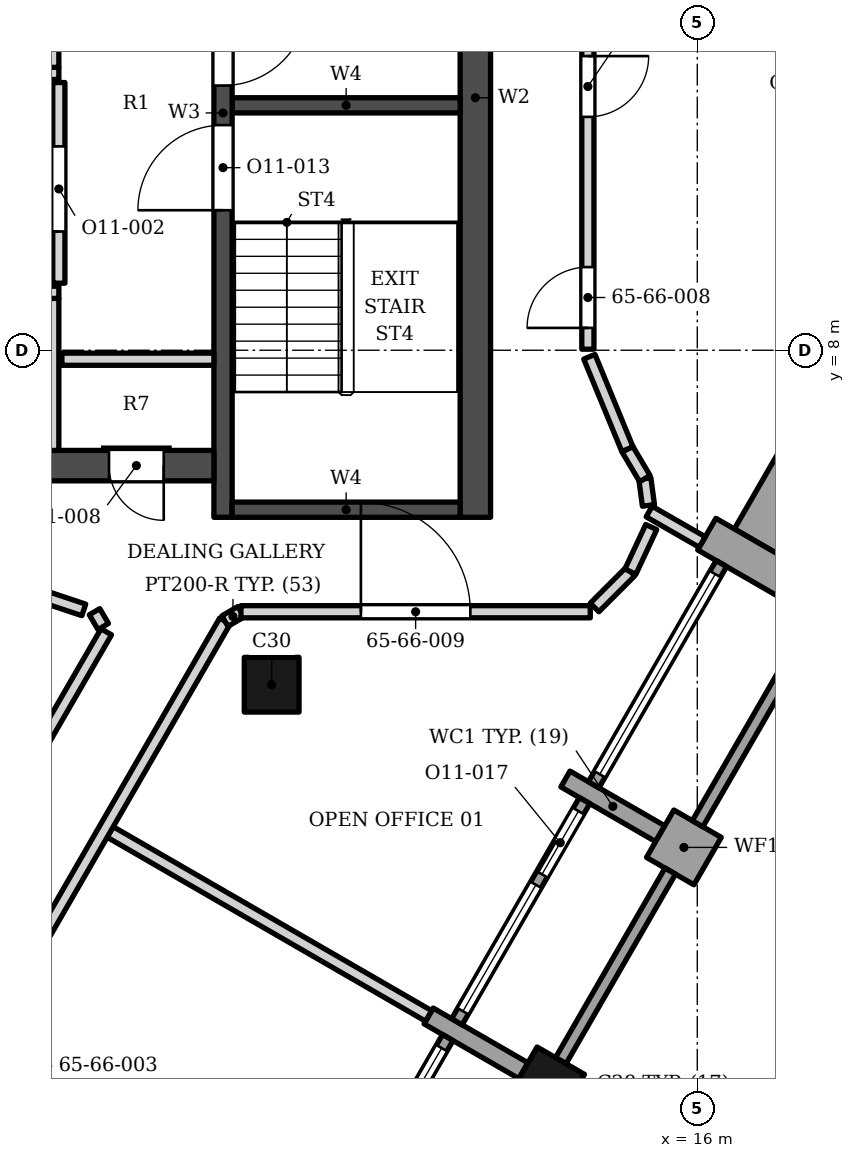
"""IFC4 building model, lengths in metres.
Left out: names, types, materials, properties, quantities, classifications, styles, units other than length and angle.
Written with IfcOpenShell. Run it as: python <this file> out.ifc"""

import sys

from ifc_helpers import new_model, si_unit, direction, frame, frame_2d, origin, origin_2d, place, context, subcontext, project, spatial, polyline, rectangle, outline, extrude, element, fill, save


model = new_model("IFC4")
c1 = context("Model", 3, precision=1e-05, world=origin(), true_north=direction((0.0, 1.0)))
c2 = subcontext(c1, "Body", "Model", "MODEL_VIEW")
j1 = project(units=[si_unit("LENGTHUNIT", "METRE"), si_unit("PLANEANGLEUNIT", "RADIAN")], contexts=[c1])
p1 = place(None, origin())
s1 = spatial("IfcSite", under=j1, at=p1, CompositionType="ELEMENT")
p2 = place(p1, origin())
s2 = spatial("IfcBuilding", under=s1, at=p2, CompositionType="ELEMENT")
p3 = place(p2, frame((0.0, 0.0, 271.6)))
s3 = spatial("IfcBuildingStorey", under=s2, at=p3, CompositionType="ELEMENT", Elevation=271.6)
p4 = place(p3, frame((12.35, 5.253, 0.0), z_axis=(0.0, 0.0, 1.0), x_axis=(0.0, 1.0, 0.0)))
e1 = element("IfcWall", 1, at=p4, inside=s3, PredefinedType="SHEAR", context=c2, shape_type="SweptSolid", body=[
    extrude(rectangle(XDim=13.8, YDim=0.5, at=frame_2d((6.9, 0.0))), origin(), (0.0, 0.0, 1.0), 3.9),
])
p5 = place(p3, frame((8.2, 5.253, 0.0), z_axis=(0.0, 0.0, 1.0), x_axis=(0.0, 1.0, 0.0)))
e2 = element("IfcWall", 2, at=p5, inside=s3, PredefinedType="SHEAR", context=c2, shape_type="SweptSolid", body=[
    extrude(rectangle(XDim=13.3, YDim=0.3, at=frame_2d((6.65, 0.0))), origin(), (0.0, 0.0, 1.0), 3.9),
])
p6 = place(p5, frame((7.1, 0.0, 0.0)))
e3 = element("IfcOpeningElement", 3, at=p6, cuts=e2, PredefinedType="OPENING", context=c2, shape_type="SweptSolid", body=[
    extrude(rectangle(XDim=1.4, YDim=2.1, at=frame_2d((0.7, 1.05))), frame((0.0, 0.16, 0.0), z_axis=(0.0, -1.0, 0.0), x_axis=(1.0, 0.0, 0.0)), (0.0, 0.0, 1.0), 0.32),
])
p7 = place(p5, frame((5.05, 0.0, 0.0)))
e4 = element("IfcOpeningElement", 4, at=p7, cuts=e2, PredefinedType="OPENING", context=c2, shape_type="SweptSolid", body=[
    extrude(rectangle(XDim=1.4, YDim=2.1, at=frame_2d((0.7, 1.05))), frame((0.0, 0.16, 0.0), z_axis=(0.0, -1.0, 0.0), x_axis=(1.0, 0.0, 0.0)), (0.0, 0.0, 1.0), 0.32),
])
for number, where, z_axis, x_axis in (
    (5, (8.35, 12.028, 0.0), (0.0, 0.0, 1.0), (1.0, 0.0, 0.0)),
    (6, (8.35, 5.378, 0.0), (0.0, 0.0, 1.0), (1.0, 0.0, 0.0)),
):
    element("IfcWall", number, at=place(p3, frame(where, z_axis=z_axis, x_axis=x_axis)), inside=s3, PredefinedType="SHEAR", context=c2, shape_type="SweptSolid", body=[
        extrude(rectangle(XDim=3.75, YDim=0.25, at=frame_2d((1.875, 0.0))), origin(), (0.0, 0.0, 1.0), 3.9),
    ])
p8 = place(p3, frame((1.0, 6.103, 0.0), z_axis=(0.0, 0.0, 1.0), x_axis=(1.0, 0.0, 0.0)))
e7 = element("IfcWall", 7, at=p8, inside=s3, PredefinedType="SHEAR", context=c2, shape_type="SweptSolid", body=[
    extrude(rectangle(XDim=7.05, YDim=0.5, at=frame_2d((3.525, 0.0))), origin(), (0.0, 0.0, 1.0), 3.9),
])
p9 = place(p8, frame((5.325, 0.0, 0.0)))
e8 = element("IfcOpeningElement", 8, at=p9, cuts=e7, PredefinedType="OPENING", context=c2, shape_type="SweptSolid", body=[
    extrude(rectangle(XDim=0.9, YDim=2.1, at=frame_2d((0.45, 1.05))), frame((0.0, 0.26, 0.0), z_axis=(0.0, -1.0, 0.0), x_axis=(1.0, 0.0, 0.0)), (0.0, 0.0, 1.0), 0.52),
])
for number, where, z_axis, x_axis in (
    (9, (9.0, 2.5, 0.0), (0.0, 0.0, 1.0), (1.0, 0.0, 0.0)),
    (10, (13.53, -4.073, 0.0), (0.0, 0.0, 1.0), (0.5, 0.866, 0.0)),
):
    element("IfcColumn", number, at=place(p3, frame(where, z_axis=z_axis, x_axis=x_axis)), inside=s3, PredefinedType="COLUMN", context=c2, shape_type="SweptSolid", body=[
        extrude(rectangle(XDim=0.9, YDim=0.9, at=origin_2d()), origin(), (0.0, 0.0, 1.0), 3.9),
    ])
p10 = place(p3, frame((13.14, -3.848, 0.0), z_axis=(0.0, 0.0, 1.0), x_axis=(-0.866047807691, 0.499961193289, 0.0)))
e11 = element("IfcWall", 11, at=p10, inside=s3, PredefinedType="SOLIDWALL", context=c2, shape_type="SweptSolid", body=[
    extrude(rectangle(XDim=1.8, YDim=0.3, at=frame_2d((0.9, 0.0))), origin(), (0.0, 0.0, 1.0), 3.0),
])
p11 = place(p3, frame((16.17, -0.401, 0.0), z_axis=(0.0, 0.0, 1.0), x_axis=(-0.866081705922, 0.499902469156, 0.0)))
e12 = element("IfcWall", 12, at=p11, inside=s3, PredefinedType="SOLIDWALL", context=c2, shape_type="SweptSolid", body=[
    extrude(rectangle(XDim=0.9, YDim=0.9, at=frame_2d((0.45, 0.0))), origin(), (0.0, 0.0, 1.0), 3.0),
])
p12 = place(p3, frame((13.831, 0.949, 0.0), z_axis=(0.0, 0.0, 1.0), x_axis=(0.865989075817, -0.500062916607, 0.0)))
e13 = element("IfcWall", 13, at=p12, inside=s3, PredefinedType="SOLIDWALL", context=c2, shape_type="SweptSolid", body=[
    extrude(rectangle(XDim=1.8, YDim=0.3, at=frame_2d((0.9, 0.0))), origin(), (0.0, 0.0, 1.0), 3.0),
])
p13 = place(p3, frame((17.715, 4.076, 0.0), z_axis=(0.0, 0.0, 1.0), x_axis=(-0.866047807691, 0.499961193289, 0.0)))
e14 = element("IfcWall", 14, at=p13, inside=s3, PredefinedType="SOLIDWALL", context=c2, shape_type="SweptSolid", body=[
    extrude(rectangle(XDim=1.8, YDim=0.6, at=frame_2d((0.9, 0.0))), origin(), (0.0, 0.0, 1.0), 2.95),
])
p14 = place(p3, frame((9.796, -6.94, 0.0), z_axis=(0.0, 0.0, 1.0), x_axis=(0.499958946799, 0.866049104564, 0.0)))
e15 = element("IfcWall", 15, at=p14, inside=s3, PredefinedType="ELEMENTEDWALL", context=c2, shape_type="SweptSolid", body=[
    extrude(rectangle(XDim=4.2, YDim=0.2, at=frame_2d((2.1, 0.0))), origin(), (0.0, 0.0, 1.0), 3.0),
])
p15 = place(p14, frame((0.2, 0.0, 0.45)))
e16 = element("IfcOpeningElement", 16, at=p15, cuts=e15, PredefinedType="OPENING", context=c2, shape_type="SweptSolid", body=[
    extrude(rectangle(XDim=3.8, YDim=2.25, at=frame_2d((1.9, 1.125))), frame((0.0, 0.11, 0.0), z_axis=(0.0, -1.0, 0.0), x_axis=(1.0, 0.0, 0.0)), (0.0, 0.0, 1.0), 0.22),
])
p16 = place(p3, frame((13.755, -3.683, 0.0), z_axis=(0.0, 0.0, 1.0), x_axis=(0.499982693035, 0.866035395735, 0.0)))
e17 = element("IfcWall", 17, at=p16, inside=s3, PredefinedType="SOLIDWALL", context=c2, shape_type="SweptSolid", body=[
    extrude(rectangle(XDim=3.6, YDim=0.2, at=frame_2d((1.8, 0.0))), origin(), (0.0, 0.0, 1.0), 3.0),
])
p17 = place(p3, frame((12.046, -3.043, 0.0), z_axis=(0.0, 0.0, 1.0), x_axis=(0.49998411664, 0.866034573852, 0.0)))
e18 = element("IfcWall", 18, at=p17, inside=s3, PredefinedType="ELEMENTEDWALL", context=c2, shape_type="SweptSolid", body=[
    extrude(rectangle(XDim=4.2, YDim=0.2, at=frame_2d((2.1, 0.0))), origin(), (0.0, 0.0, 1.0), 3.0),
])
p18 = place(p17, frame((0.2, 0.0, 0.45)))
e19 = element("IfcOpeningElement", 19, at=p18, cuts=e18, PredefinedType="OPENING", context=c2, shape_type="SweptSolid", body=[
    extrude(rectangle(XDim=2.4, YDim=2.25, at=frame_2d((1.2, 1.125))), frame((0.0, 0.11, 0.0), z_axis=(0.0, -1.0, 0.0), x_axis=(1.0, 0.0, 0.0)), (0.0, 0.0, 1.0), 0.22),
])
p19 = place(p17, frame((2.8, 0.0, 0.0)))
e20 = element("IfcOpeningElement", 20, at=p19, cuts=e18, PredefinedType="OPENING", context=c2, shape_type="SweptSolid", body=[
    extrude(rectangle(XDim=1.2, YDim=2.7, at=frame_2d((0.6, 1.35))), frame((0.0, 0.11, 0.0), z_axis=(0.0, -1.0, 0.0), x_axis=(1.0, 0.0, 0.0)), (0.0, 0.0, 1.0), 0.22),
])
p20 = place(p3, frame((16.005, 0.214, 0.0), z_axis=(0.0, 0.0, 1.0), x_axis=(0.500012057535, 0.866018442252, 0.0)))
e21 = element("IfcWall", 21, at=p20, inside=s3, PredefinedType="SOLIDWALL", context=c2, shape_type="SweptSolid", body=[
    extrude(rectangle(XDim=3.6, YDim=0.2, at=frame_2d((1.8, 0.0))), origin(), (0.0, 0.0, 1.0), 3.0),
])
p21 = place(p3, frame((14.296, 0.854, 0.0), z_axis=(0.0, 0.0, 1.0), x_axis=(0.499958946799, 0.866049104564, 0.0)))
e22 = element("IfcWall", 22, at=p21, inside=s3, PredefinedType="ELEMENTEDWALL", context=c2, shape_type="SweptSolid", body=[
    extrude(rectangle(XDim=4.2, YDim=0.2, at=frame_2d((2.1, 0.0))), origin(), (0.0, 0.0, 1.0), 2.95),
])
p22 = place(p21, frame((0.2, 0.0, 0.45)))
e23 = element("IfcOpeningElement", 23, at=p22, cuts=e22, PredefinedType="OPENING", context=c2, shape_type="SweptSolid", body=[
    extrude(rectangle(XDim=3.8, YDim=2.25, at=frame_2d((1.9, 1.125))), frame((0.0, 0.11, 0.0), z_axis=(0.0, -1.0, 0.0), x_axis=(1.0, 0.0, 0.0)), (0.0, 0.0, 1.0), 0.22),
])
p23 = place(p3, origin())
e24 = element("IfcWall", 24, at=p23, inside=s3, PredefinedType="SOLIDWALL", context=c2, shape_type="SweptSolid", body=[
    extrude(outline(polyline([(18.236, 7.878), (16.609, 5.061), (18.645, 3.886), (20.271, 6.703), (18.236, 7.878)])), origin(), (0.0, 0.0, 1.0), 2.973),
])
for number, where, z_axis, x_axis in (
    (25, (5.4, 6.353, 0.0), (0.0, 0.0, 1.0), (0.0, 1.0, 0.0)),
    (26, (5.55, 7.853, 0.0), (0.0, 0.0, 1.0), (1.0, 0.0, 0.0)),
):
    element("IfcWall", number, at=place(p3, frame(where, z_axis=z_axis, x_axis=x_axis)), inside=s3, PredefinedType="SOLIDWALL", context=c2, shape_type="SweptSolid", body=[
        extrude(rectangle(XDim=2.5, YDim=0.2, at=frame_2d((1.25, 0.0))), origin(), (0.0, 0.0, 1.0), 3.73),
    ])
p24 = place(p3, frame((1.0, 8.953, 0.0), z_axis=(0.0, 0.0, 1.0), x_axis=(1.0, 0.0, 0.0)))
e27 = element("IfcWall", 27, at=p24, inside=s3, PredefinedType="SOLIDWALL", context=c2, shape_type="SweptSolid", body=[
    extrude(rectangle(XDim=4.5, YDim=0.2, at=frame_2d((2.25, 0.0))), origin(), (0.0, 0.0, 1.0), 3.73),
])
p25 = place(p24, frame((0.625, 0.0, 0.0)))
e28 = element("IfcOpeningElement", 28, at=p25, cuts=e27, PredefinedType="OPENING", context=c2, shape_type="SweptSolid", body=[
    extrude(rectangle(XDim=1.1, YDim=2.1, at=frame_2d((0.55, 1.05))), frame((0.0, 0.11, 0.0), z_axis=(0.0, -1.0, 0.0), x_axis=(1.0, 0.0, 0.0)), (0.0, 0.0, 1.0), 0.22),
])
p26 = place(p24, frame((2.775, 0.0, 0.0)))
e29 = element("IfcOpeningElement", 29, at=p26, cuts=e27, PredefinedType="OPENING", context=c2, shape_type="SweptSolid", body=[
    extrude(rectangle(XDim=1.1, YDim=2.1, at=frame_2d((0.55, 1.05))), frame((0.0, 0.11, 0.0), z_axis=(0.0, -1.0, 0.0), x_axis=(1.0, 0.0, 0.0)), (0.0, 0.0, 1.0), 0.22),
])
p27 = place(p3, frame((5.5, 9.103, 0.0), z_axis=(0.0, 0.0, 1.0), x_axis=(0.0, 1.0, 0.0)))
e30 = element("IfcWall", 30, at=p27, inside=s3, PredefinedType="SOLIDWALL", context=c2, shape_type="SweptSolid", body=[
    extrude(rectangle(XDim=3.3, YDim=0.2, at=frame_2d((1.65, 0.0))), origin(), (0.0, 0.0, 1.0), 3.73),
])
p28 = place(p27, frame((0.85, 0.0, 0.0)))
e31 = element("IfcOpeningElement", 31, at=p28, cuts=e30, PredefinedType="OPENING", context=c2, shape_type="SweptSolid", body=[
    extrude(rectangle(XDim=1.4, YDim=2.1, at=frame_2d((0.7, 1.05))), frame((0.0, 0.11, 0.0), z_axis=(0.0, -1.0, 0.0), x_axis=(1.0, 0.0, 0.0)), (0.0, 0.0, 1.0), 0.22),
])
p29 = place(p3, frame((-1.5, 12.552, 0.0), z_axis=(0.0, 0.0, 1.0), x_axis=(1.0, 0.0, 0.0)))
e32 = element("IfcWall", 32, at=p29, inside=s3, PredefinedType="SOLIDWALL", context=c2, shape_type="SweptSolid", body=[
    extrude(rectangle(XDim=7.0, YDim=0.2, at=frame_2d((3.5, 0.0))), origin(), (0.0, 0.0, 1.0), 3.73),
])
p30 = place(p29, frame((3.075, 0.0, 0.0)))
e33 = element("IfcOpeningElement", 33, at=p30, cuts=e32, PredefinedType="OPENING", context=c2, shape_type="SweptSolid", body=[
    extrude(rectangle(XDim=1.1, YDim=2.1, at=frame_2d((0.55, 1.05))), frame((0.0, 0.11, 0.0), z_axis=(0.0, -1.0, 0.0), x_axis=(1.0, 0.0, 0.0)), (0.0, 0.0, 1.0), 0.22),
])
p31 = place(p29, frame((5.275, 0.0, 0.0)))
e34 = element("IfcOpeningElement", 34, at=p31, cuts=e32, PredefinedType="OPENING", context=c2, shape_type="SweptSolid", body=[
    extrude(rectangle(XDim=1.1, YDim=2.1, at=frame_2d((0.55, 1.05))), frame((0.0, 0.11, 0.0), z_axis=(0.0, -1.0, 0.0), x_axis=(1.0, 0.0, 0.0)), (0.0, 0.0, 1.0), 0.22),
])
p32 = place(p3, frame((5.4, 12.653, 0.0), z_axis=(0.0, 0.0, 1.0), x_axis=(0.0, 1.0, 0.0)))
e35 = element("IfcWall", 35, at=p32, inside=s3, PredefinedType="SOLIDWALL", context=c2, shape_type="SweptSolid", body=[
    extrude(rectangle(XDim=1.6, YDim=0.2, at=frame_2d((0.8, 0.0))), origin(), (0.0, 0.0, 1.0), 3.73),
])
p33 = place(p3, frame((6.344, 0.079, 0.0), z_axis=(0.0, 0.0, 1.0), x_axis=(0.865886439471, -0.500240616045, 0.0)))
e36 = element("IfcWall", 36, at=p33, inside=s3, PredefinedType="PARTITIONING", context=c2, shape_type="SweptSolid", body=[
    extrude(rectangle(XDim=6.049, YDim=0.2, at=frame_2d((3.025, 0.0))), origin(), (0.0, 0.0, 1.0), 3.052),
])
p34 = place(p3, frame((4.894, 0.974, 0.0), z_axis=(0.0, 0.0, 1.0), x_axis=(0.500549430369, 0.865707957545, 0.0)))
e37 = element("IfcWall", 37, at=p34, inside=s3, PredefinedType="PARTITIONING", context=c2, shape_type="SweptSolid", body=[
    extrude(rectangle(XDim=2.768, YDim=0.2, at=frame_2d((1.384, 0.0))), origin(), (0.0, 0.0, 1.0), 3.73),
])
p35 = place(p3, frame((6.087, 3.7, 0.0), z_axis=(0.0, 0.0, 1.0), x_axis=(0.503763385613, -0.863841681858, 0.0)))
e38 = element("IfcWall", 38, at=p35, inside=s3, PredefinedType="PARTITIONING", context=c2, shape_type="SweptSolid", body=[
    extrude(rectangle(XDim=0.282, YDim=0.2, at=frame_2d((0.141, 0.0))), origin(), (0.0, 0.0, 1.0), 3.73),
])
p36 = place(p3, frame((1.757, -7.668, 0.0), z_axis=(0.0, 0.0, 1.0), x_axis=(0.500002084865, 0.866024200084, 0.0)))
e39 = element("IfcWall", 39, at=p36, inside=s3, PredefinedType="PARTITIONING", context=c2, shape_type="SweptSolid", body=[
    extrude(rectangle(XDim=12.949, YDim=0.2, at=frame_2d((6.474, 0.0))), origin(), (0.0, 0.0, 1.0), 2.884),
])
p37 = place(p36, frame((4.0, 0.0, 0.0)))
e40 = element("IfcOpeningElement", 40, at=p37, cuts=e39, PredefinedType="OPENING", context=c2, shape_type="SweptSolid", body=[
    extrude(rectangle(XDim=1.0, YDim=2.4, at=frame_2d((0.5, 1.2))), frame((0.0, 0.11, 0.0), z_axis=(0.0, -1.0, 0.0), x_axis=(1.0, 0.0, 0.0)), (0.0, 0.0, 1.0), 0.22),
])
p38 = place(p3, frame((8.231, 3.546, 0.0), z_axis=(0.0, 0.0, 1.0), x_axis=(0.863778900898, 0.503871025524, 0.0)))
e41 = element("IfcWall", 41, at=p38, inside=s3, PredefinedType="PARTITIONING", context=c2, shape_type="SweptSolid", body=[
    extrude(rectangle(XDim=0.305, YDim=0.2, at=frame_2d((0.153, 0.0))), origin(), (0.0, 0.0, 1.0), 3.73),
])
p39 = place(p3, frame((8.495, 3.699, 0.0), z_axis=(0.0, 0.0, 1.0), x_axis=(1.0, 0.0, 0.0)))
e42 = element("IfcWall", 42, at=p39, inside=s3, PredefinedType="PARTITIONING", context=c2, shape_type="SweptSolid", body=[
    extrude(rectangle(XDim=5.745, YDim=0.2, at=frame_2d((2.873, 0.0))), origin(), (0.0, 0.0, 1.0), 3.282),
])
p40 = place(p39, frame((1.972, 0.0, 0.0)))
e43 = element("IfcOpeningElement", 43, at=p40, cuts=e42, PredefinedType="OPENING", context=c2, shape_type="SweptSolid", body=[
    extrude(rectangle(XDim=1.8, YDim=2.4, at=frame_2d((0.9, 1.2))), frame((0.0, 0.11, 0.0), z_axis=(0.0, -1.0, 0.0), x_axis=(1.0, 0.0, 0.0)), (0.0, 0.0, 1.0), 0.22),
])
p41 = place(p3, frame((4.393, 4.236, 0.0), z_axis=(0.0, 0.0, 1.0), x_axis=(0.948729076189, -0.316090398453, 0.0)))
e44 = element("IfcWall", 44, at=p41, inside=s3, PredefinedType="PARTITIONING", context=c2, shape_type="SweptSolid", body=[
    extrude(rectangle(XDim=1.6, YDim=0.2, at=frame_2d((0.8, 0.0))), origin(), (0.0, 0.0, 1.0), 2.884),
])
p42 = place(p3, frame((14.311, 3.77, 0.0), z_axis=(0.0, 0.0, 1.0), x_axis=(0.707106781187, 0.707106781187, 0.0)))
e45 = element("IfcWall", 45, at=p42, inside=s3, PredefinedType="PARTITIONING", context=c2, shape_type="SweptSolid", body=[
    extrude(rectangle(XDim=0.834, YDim=0.2, at=frame_2d((0.417, 0.0))), origin(), (0.0, 0.0, 1.0), 3.73),
])
p43 = place(p3, frame((15.209, 5.348, 0.0), z_axis=(0.0, 0.0, 1.0), x_axis=(0.866911543868, -0.498462009695, 0.0)))
e46 = element("IfcWall", 46, at=p43, inside=s3, PredefinedType="PARTITIONING", context=c2, shape_type="SweptSolid", body=[
    extrude(rectangle(XDim=1.007, YDim=0.2, at=frame_2d((0.503, 0.0))), origin(), (0.0, 0.0, 1.0), 2.95),
])
p44 = place(p3, frame((14.9, 4.36, 0.0), z_axis=(0.0, 0.0, 1.0), x_axis=(0.423249280481, 0.906013270638, 0.0)))
e47 = element("IfcWall", 47, at=p44, inside=s3, PredefinedType="PARTITIONING", context=c2, shape_type="SweptSolid", body=[
    extrude(rectangle(XDim=0.808, YDim=0.2, at=frame_2d((0.404, 0.0))), origin(), (0.0, 0.0, 1.0), 2.95),
])
p45 = place(p3, frame((15.137, 5.889, 0.0), z_axis=(0.0, 0.0, 1.0), x_axis=(0.133422383108, -0.991059265476, 0.0)))
e48 = element("IfcWall", 48, at=p45, inside=s3, PredefinedType="PARTITIONING", context=c2, shape_type="SweptSolid", body=[
    extrude(rectangle(XDim=0.445, YDim=0.2, at=frame_2d((0.222, 0.0))), origin(), (0.0, 0.0, 1.0), 3.73),
])
p46 = place(p3, frame((14.851, 6.374, 0.0), z_axis=(0.0, 0.0, 1.0), x_axis=(0.509576505793, -0.860425351058, 0.0)))
e49 = element("IfcWall", 49, at=p46, inside=s3, PredefinedType="PARTITIONING", context=c2, shape_type="SweptSolid", body=[
    extrude(rectangle(XDim=0.563, YDim=0.2, at=frame_2d((0.281, 0.0))), origin(), (0.0, 0.0, 1.0), 3.73),
])
p47 = place(p3, frame((14.225, 7.893, 0.0), z_axis=(0.0, 0.0, 1.0), x_axis=(0.380697489052, -0.924699638709, 0.0)))
e50 = element("IfcWall", 50, at=p47, inside=s3, PredefinedType="PARTITIONING", context=c2, shape_type="SweptSolid", body=[
    extrude(rectangle(XDim=1.643, YDim=0.2, at=frame_2d((0.822, 0.0))), origin(), (0.0, 0.0, 1.0), 3.73),
])
p48 = place(p3, frame((14.2, 8.017, 0.0), z_axis=(0.0, 0.0, 1.0), x_axis=(0.0, 1.0, 0.0)))
e51 = element("IfcWall", 51, at=p48, inside=s3, PredefinedType="PARTITIONING", context=c2, shape_type="SweptSolid", body=[
    extrude(rectangle(XDim=5.4, YDim=0.2, at=frame_2d((2.7, 0.0))), origin(), (0.0, 0.0, 1.0), 3.73),
])
p49 = place(p48, frame((3.82, 0.0, 0.0)))
e52 = element("IfcOpeningElement", 52, at=p49, cuts=e51, PredefinedType="OPENING", context=c2, shape_type="SweptSolid", body=[
    extrude(rectangle(XDim=1.0, YDim=2.1, at=frame_2d((0.5, 1.05))), frame((0.0, 0.11, 0.0), z_axis=(0.0, -1.0, 0.0), x_axis=(1.0, 0.0, 0.0)), (0.0, 0.0, 1.0), 0.22),
])
p50 = place(p48, frame((0.35, 0.0, 0.0)))
e53 = element("IfcOpeningElement", 53, at=p50, cuts=e51, PredefinedType="OPENING", context=c2, shape_type="SweptSolid", body=[
    extrude(rectangle(XDim=1.0, YDim=2.1, at=frame_2d((0.5, 1.05))), frame((0.0, 0.11, 0.0), z_axis=(0.0, -1.0, 0.0), x_axis=(1.0, 0.0, 0.0)), (0.0, 0.0, 1.0), 0.22),
])
p51 = place(p15, origin())
e54 = element("IfcWindow", 54, at=p51, inside=s3, PartitioningType="SINGLE_PANEL", PredefinedType="WINDOW", context=c2, shape_type="SweptSolid", body=[
    extrude(rectangle(XDim=3.8, YDim=2.25, at=frame_2d((1.9, 1.125))), frame((0.0, 0.03, 0.0), z_axis=(0.0, -1.0, 0.0), x_axis=(1.0, 0.0, 0.0)), (0.0, 0.0, 1.0), 0.06),
])
fill(e16, e54)
p52 = place(p18, origin())
e55 = element("IfcWindow", 55, at=p52, inside=s3, PartitioningType="SINGLE_PANEL", PredefinedType="WINDOW", context=c2, shape_type="SweptSolid", body=[
    extrude(rectangle(XDim=2.4, YDim=2.25, at=frame_2d((1.2, 1.125))), frame((0.0, 0.03, 0.0), z_axis=(0.0, -1.0, 0.0), x_axis=(1.0, 0.0, 0.0)), (0.0, 0.0, 1.0), 0.06),
])
fill(e19, e55)
p53 = place(p19, origin())
e56 = element("IfcDoor", 56, at=p53, inside=s3, OperationType="SINGLE_SWING_LEFT", PredefinedType="DOOR", context=c2, shape_type="SweptSolid", body=[
    extrude(rectangle(XDim=1.2, YDim=2.7, at=frame_2d((0.6, 1.35))), frame((0.0, 0.025, 0.0), z_axis=(0.0, -1.0, 0.0), x_axis=(1.0, 0.0, 0.0)), (0.0, 0.0, 1.0), 0.05),
])
fill(e20, e56)
p54 = place(p22, origin())
e57 = element("IfcWindow", 57, at=p54, inside=s3, PartitioningType="SINGLE_PANEL", PredefinedType="WINDOW", context=c2, shape_type="SweptSolid", body=[
    extrude(rectangle(XDim=3.8, YDim=2.25, at=frame_2d((1.9, 1.125))), frame((0.0, 0.03, 0.0), z_axis=(0.0, -1.0, 0.0), x_axis=(1.0, 0.0, 0.0)), (0.0, 0.0, 1.0), 0.06),
])
fill(e23, e57)
p55 = place(p6, origin())
e58 = element("IfcDoor", 58, at=p55, inside=s3, OperationType="SINGLE_SWING_RIGHT", PredefinedType="DOOR", context=c2, shape_type="SweptSolid", body=[
    extrude(rectangle(XDim=1.4, YDim=2.1, at=frame_2d((0.7, 1.05))), frame((0.0, 0.025, 0.0), z_axis=(0.0, -1.0, 0.0), x_axis=(1.0, 0.0, 0.0)), (0.0, 0.0, 1.0), 0.05),
])
fill(e3, e58)
p56 = place(p7, origin())
e59 = element("IfcDoor", 59, at=p56, inside=s3, OperationType="SINGLE_SWING_LEFT", PredefinedType="DOOR", context=c2, shape_type="SweptSolid", body=[
    extrude(rectangle(XDim=1.4, YDim=2.1, at=frame_2d((0.7, 1.05))), frame((0.0, 0.025, 0.0), z_axis=(0.0, -1.0, 0.0), x_axis=(1.0, 0.0, 0.0)), (0.0, 0.0, 1.0), 0.05),
])
fill(e4, e59)
p57 = place(p28, origin())
e60 = element("IfcDoor", 60, at=p57, inside=s3, OperationType="SINGLE_SWING_LEFT", PredefinedType="DOOR", context=c2, shape_type="SweptSolid", body=[
    extrude(rectangle(XDim=1.4, YDim=2.1, at=frame_2d((0.7, 1.05))), frame((0.0, 0.025, 0.0), z_axis=(0.0, -1.0, 0.0), x_axis=(1.0, 0.0, 0.0)), (0.0, 0.0, 1.0), 0.05),
])
fill(e31, e60)
p58 = place(p9, origin())
e61 = element("IfcDoor", 61, at=p58, inside=s3, OperationType="SINGLE_SWING_RIGHT", PredefinedType="DOOR", context=c2, shape_type="SweptSolid", body=[
    extrude(rectangle(XDim=0.9, YDim=2.1, at=frame_2d((0.45, 1.05))), frame((0.0, 0.025, 0.0), z_axis=(0.0, -1.0, 0.0), x_axis=(1.0, 0.0, 0.0)), (0.0, 0.0, 1.0), 0.05),
])
fill(e8, e61)
p59 = place(p49, origin())
e62 = element("IfcDoor", 62, at=p59, inside=s3, OperationType="SINGLE_SWING_RIGHT", PredefinedType="DOOR", context=c2, shape_type="SweptSolid", body=[
    extrude(rectangle(XDim=1.0, YDim=2.1, at=frame_2d((0.5, 1.05))), frame((0.0, 0.025, 0.0), z_axis=(0.0, -1.0, 0.0), x_axis=(1.0, 0.0, 0.0)), (0.0, 0.0, 1.0), 0.05),
])
fill(e52, e62)
p60 = place(p50, origin())
e63 = element("IfcDoor", 63, at=p60, inside=s3, OperationType="SINGLE_SWING_LEFT", PredefinedType="DOOR", context=c2, shape_type="SweptSolid", body=[
    extrude(rectangle(XDim=1.0, YDim=2.1, at=frame_2d((0.5, 1.05))), frame((0.0, 0.025, 0.0), z_axis=(0.0, -1.0, 0.0), x_axis=(1.0, 0.0, 0.0)), (0.0, 0.0, 1.0), 0.05),
])
fill(e53, e63)
p61 = place(p40, origin())
e64 = element("IfcDoor", 64, at=p61, inside=s3, OperationType="DOUBLE_DOOR_SINGLE_SWING", PredefinedType="DOOR", context=c2, shape_type="SweptSolid", body=[
    extrude(rectangle(XDim=1.8, YDim=2.4, at=frame_2d((0.9, 1.2))), frame((0.0, 0.025, 0.0), z_axis=(0.0, -1.0, 0.0), x_axis=(1.0, 0.0, 0.0)), (0.0, 0.0, 1.0), 0.05),
])
fill(e43, e64)
save(model, sys.argv[1])
